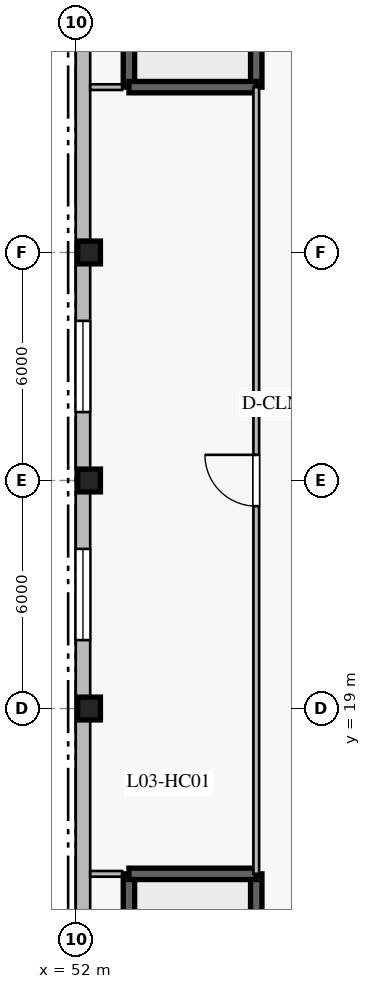
"""IFC4 building model, lengths in metres.
Left out: names, types, materials, properties, quantities, classifications, styles, units other than length and angle.
Written with IfcOpenShell. Run it as: python <this file> out.ifc"""

import sys

from ifc_helpers import new_model, si_unit, direction, frame, frame_2d, origin, origin_2d, place, context, subcontext, project, spatial, rectangle, extrude, element, fill, save


model = new_model("IFC4")
c1 = context("Model", 3, precision=1e-05, world=origin(), true_north=direction((0.0, 1.0)))
c2 = subcontext(c1, "Body", "Model", "MODEL_VIEW")
j1 = project(units=[si_unit("LENGTHUNIT", "METRE"), si_unit("PLANEANGLEUNIT", "RADIAN")], contexts=[c1])
p1 = place(None, origin())
s1 = spatial("IfcSite", under=j1, at=p1, CompositionType="ELEMENT")
p2 = place(p1, origin())
s2 = spatial("IfcBuilding", under=s1, at=p2, CompositionType="ELEMENT")
p3 = place(p2, frame((0.0, 0.0, 14.4)))
s3 = spatial("IfcBuildingStorey", under=s2, at=p3, CompositionType="ELEMENT", Elevation=14.4)
p4 = place(p3, frame((56.75, 7.35, 0.0), z_axis=(0.0, 0.0, 1.0), x_axis=(0.0, 1.0, 0.0)))
e1 = element("IfcWall", 1, at=p4, inside=s3, PredefinedType="SOLIDWALL", context=c2, shape_type="SweptSolid", body=[
    extrude(rectangle(XDim=7.3, YDim=0.3, at=frame_2d((3.65, 0.0))), origin(), (0.0, 0.0, 1.0), 4.3),
])
p5 = place(p4, frame((0.22, 0.0, 0.0)))
e2 = element("IfcOpeningElement", 2, at=p5, cuts=e1, PredefinedType="OPENING", context=c2, shape_type="SweptSolid", body=[
    extrude(rectangle(XDim=1.15, YDim=2.2, at=frame_2d((0.575, 1.1))), frame((0.0, 0.16, 0.0), z_axis=(0.0, -1.0, 0.0), x_axis=(1.0, 0.0, 0.0)), (0.0, 0.0, 1.0), 0.32),
])
p6 = place(p3, frame((53.4, 7.35, 0.0), z_axis=(0.0, 0.0, 1.0), x_axis=(0.0, 1.0, 0.0)))
e3 = element("IfcWall", 3, at=p6, inside=s3, PredefinedType="SOLIDWALL", context=c2, shape_type="SweptSolid", body=[
    extrude(rectangle(XDim=7.3, YDim=0.3, at=frame_2d((3.65, 0.0))), origin(), (0.0, 0.0, 1.0), 4.3),
])
p7 = place(p3, frame((53.4, 14.65, 0.0), z_axis=(0.0, 0.0, 1.0), x_axis=(1.0, 0.0, 0.0)))
e4 = element("IfcWall", 4, at=p7, inside=s3, PredefinedType="SOLIDWALL", context=c2, shape_type="SweptSolid", body=[
    extrude(rectangle(XDim=3.35, YDim=0.3, at=frame_2d((1.675, 0.0))), origin(), (0.0, 0.0, 1.0), 4.3),
])
p8 = place(p3, frame((56.75, 35.35, 0.0), z_axis=(0.0, 0.0, 1.0), x_axis=(0.0, 1.0, 0.0)))
e5 = element("IfcWall", 5, at=p8, inside=s3, PredefinedType="SOLIDWALL", context=c2, shape_type="SweptSolid", body=[
    extrude(rectangle(XDim=7.3, YDim=0.3, at=frame_2d((3.65, 0.0))), origin(), (0.0, 0.0, 1.0), 4.3),
])
p9 = place(p8, frame((5.92, 0.0, 0.0)))
e6 = element("IfcOpeningElement", 6, at=p9, cuts=e5, PredefinedType="OPENING", context=c2, shape_type="SweptSolid", body=[
    extrude(rectangle(XDim=1.15, YDim=2.2, at=frame_2d((0.575, 1.1))), frame((0.0, 0.16, 0.0), z_axis=(0.0, -1.0, 0.0), x_axis=(1.0, 0.0, 0.0)), (0.0, 0.0, 1.0), 0.32),
])
p10 = place(p3, frame((53.4, 35.35, 0.0), z_axis=(0.0, 0.0, 1.0), x_axis=(0.0, 1.0, 0.0)))
e7 = element("IfcWall", 7, at=p10, inside=s3, PredefinedType="SOLIDWALL", context=c2, shape_type="SweptSolid", body=[
    extrude(rectangle(XDim=7.3, YDim=0.3, at=frame_2d((3.65, 0.0))), origin(), (0.0, 0.0, 1.0), 4.3),
])
p11 = place(p3, frame((53.4, 35.35, 0.0), z_axis=(0.0, 0.0, 1.0), x_axis=(1.0, 0.0, 0.0)))
e8 = element("IfcWall", 8, at=p11, inside=s3, PredefinedType="SOLIDWALL", context=c2, shape_type="SweptSolid", body=[
    extrude(rectangle(XDim=3.35, YDim=0.3, at=frame_2d((1.675, 0.0))), origin(), (0.0, 0.0, 1.0), 4.3),
])
for number, where, z_axis, x_axis in (
    (9, (52.35, 19.0, 0.0), (0.0, 0.0, 1.0), (1.0, 0.0, 0.0)),
    (10, (52.35, 25.0, 0.0), (0.0, 0.0, 1.0), (1.0, 0.0, 0.0)),
    (11, (52.35, 31.0, 0.0), (0.0, 0.0, 1.0), (1.0, 0.0, 0.0)),
):
    element("IfcColumn", number, at=place(p3, frame(where, z_axis=z_axis, x_axis=x_axis)), inside=s3, PredefinedType="COLUMN", context=c2, shape_type="SweptSolid", body=[
        extrude(rectangle(XDim=0.6, YDim=0.6, at=origin_2d()), origin(), (0.0, 0.0, 1.0), 4.6),
    ])
p12 = place(p3, frame((52.19, 7.38, 0.0), z_axis=(0.0, 0.0, 1.0), x_axis=(0.0, 1.0, 0.0)))
e12 = element("IfcWall", 12, at=p12, inside=s3, PredefinedType="STANDARD", context=c2, shape_type="SweptSolid", body=[
    extrude(rectangle(XDim=35.24, YDim=0.38, at=frame_2d((17.62, 0.0))), origin(), (0.0, 0.0, 1.0), 4.3),
])
p13 = place(p12, frame((3.02, 0.0, 0.95)))
e13 = element("IfcOpeningElement", 13, at=p13, cuts=e12, PredefinedType="OPENING", context=c2, shape_type="SweptSolid", body=[
    extrude(rectangle(XDim=1.2, YDim=1.8, at=frame_2d((0.6, 0.9))), frame((0.0, 0.2, 0.0), z_axis=(0.0, -1.0, 0.0), x_axis=(1.0, 0.0, 0.0)), (0.0, 0.0, 1.0), 0.4),
])
p14 = place(p12, frame((13.42, 0.0, 0.95)))
e14 = element("IfcOpeningElement", 14, at=p14, cuts=e12, PredefinedType="OPENING", context=c2, shape_type="SweptSolid", body=[
    extrude(rectangle(XDim=2.4, YDim=1.8, at=frame_2d((1.2, 0.9))), frame((0.0, 0.2, 0.0), z_axis=(0.0, -1.0, 0.0), x_axis=(1.0, 0.0, 0.0)), (0.0, 0.0, 1.0), 0.4),
])
p15 = place(p12, frame((19.42, 0.0, 0.95)))
e15 = element("IfcOpeningElement", 15, at=p15, cuts=e12, PredefinedType="OPENING", context=c2, shape_type="SweptSolid", body=[
    extrude(rectangle(XDim=2.4, YDim=1.8, at=frame_2d((1.2, 0.9))), frame((0.0, 0.2, 0.0), z_axis=(0.0, -1.0, 0.0), x_axis=(1.0, 0.0, 0.0)), (0.0, 0.0, 1.0), 0.4),
])
p16 = place(p12, frame((31.02, 0.0, 0.95)))
e16 = element("IfcOpeningElement", 16, at=p16, cuts=e12, PredefinedType="OPENING", context=c2, shape_type="SweptSolid", body=[
    extrude(rectangle(XDim=1.2, YDim=1.8, at=frame_2d((0.6, 0.9))), frame((0.0, 0.2, 0.0), z_axis=(0.0, -1.0, 0.0), x_axis=(1.0, 0.0, 0.0)), (0.0, 0.0, 1.0), 0.4),
])
p17 = place(p3, frame((56.75, 14.65, 0.0), z_axis=(0.0, 0.0, 1.0), x_axis=(0.0, 1.0, 0.0)))
e17 = element("IfcWall", 17, at=p17, inside=s3, PredefinedType="PARTITIONING", context=c2, shape_type="SweptSolid", body=[
    extrude(rectangle(XDim=20.7, YDim=0.15, at=frame_2d((10.35, 0.0))), origin(), (0.0, 0.0, 1.0), 4.3),
])
p18 = place(p17, frame((9.675, 0.0, 0.0)))
e18 = element("IfcOpeningElement", 18, at=p18, cuts=e17, PredefinedType="OPENING", context=c2, shape_type="SweptSolid", body=[
    extrude(rectangle(XDim=1.35, YDim=2.2, at=frame_2d((0.675, 1.1))), frame((0.0, 0.085, 0.0), z_axis=(0.0, -1.0, 0.0), x_axis=(1.0, 0.0, 0.0)), (0.0, 0.0, 1.0), 0.17),
])
for number, where, z_axis, x_axis in (
    (19, (52.38, 14.65, 0.0), (0.0, 0.0, 1.0), (1.0, 0.0, 0.0)),
    (20, (52.38, 35.35, 0.0), (0.0, 0.0, 1.0), (1.0, 0.0, 0.0)),
):
    element("IfcWall", number, at=place(p3, frame(where, z_axis=z_axis, x_axis=x_axis)), inside=s3, PredefinedType="PARTITIONING", context=c2, shape_type="SweptSolid", body=[
        extrude(rectangle(XDim=0.84, YDim=0.15, at=frame_2d((0.42, 0.0))), origin(), (0.0, 0.0, 1.0), 3.94),
    ])
p19 = place(p14, origin())
e21 = element("IfcWindow", 21, at=p19, inside=s3, PartitioningType="TRIPLE_PANEL_VERTICAL", PredefinedType="WINDOW", context=c2, shape_type="SweptSolid", body=[
    extrude(rectangle(XDim=2.4, YDim=1.8, at=frame_2d((1.2, 0.9))), frame((0.0, 0.03, 0.0), z_axis=(0.0, -1.0, 0.0), x_axis=(1.0, 0.0, 0.0)), (0.0, 0.0, 1.0), 0.06),
])
fill(e14, e21)
p20 = place(p15, origin())
e22 = element("IfcWindow", 22, at=p20, inside=s3, PartitioningType="TRIPLE_PANEL_VERTICAL", PredefinedType="WINDOW", context=c2, shape_type="SweptSolid", body=[
    extrude(rectangle(XDim=2.4, YDim=1.8, at=frame_2d((1.2, 0.9))), frame((0.0, 0.03, 0.0), z_axis=(0.0, -1.0, 0.0), x_axis=(1.0, 0.0, 0.0)), (0.0, 0.0, 1.0), 0.06),
])
fill(e15, e22)
p21 = place(p18, origin())
e23 = element("IfcDoor", 23, at=p21, inside=s3, OperationType="SINGLE_SWING_RIGHT", PredefinedType="DOOR", context=c2, shape_type="SweptSolid", body=[
    extrude(rectangle(XDim=1.35, YDim=2.2, at=frame_2d((0.675, 1.1))), frame((0.0, 0.025, 0.0), z_axis=(0.0, -1.0, 0.0), x_axis=(1.0, 0.0, 0.0)), (0.0, 0.0, 1.0), 0.05),
])
fill(e18, e23)
save(model, sys.argv[1])
